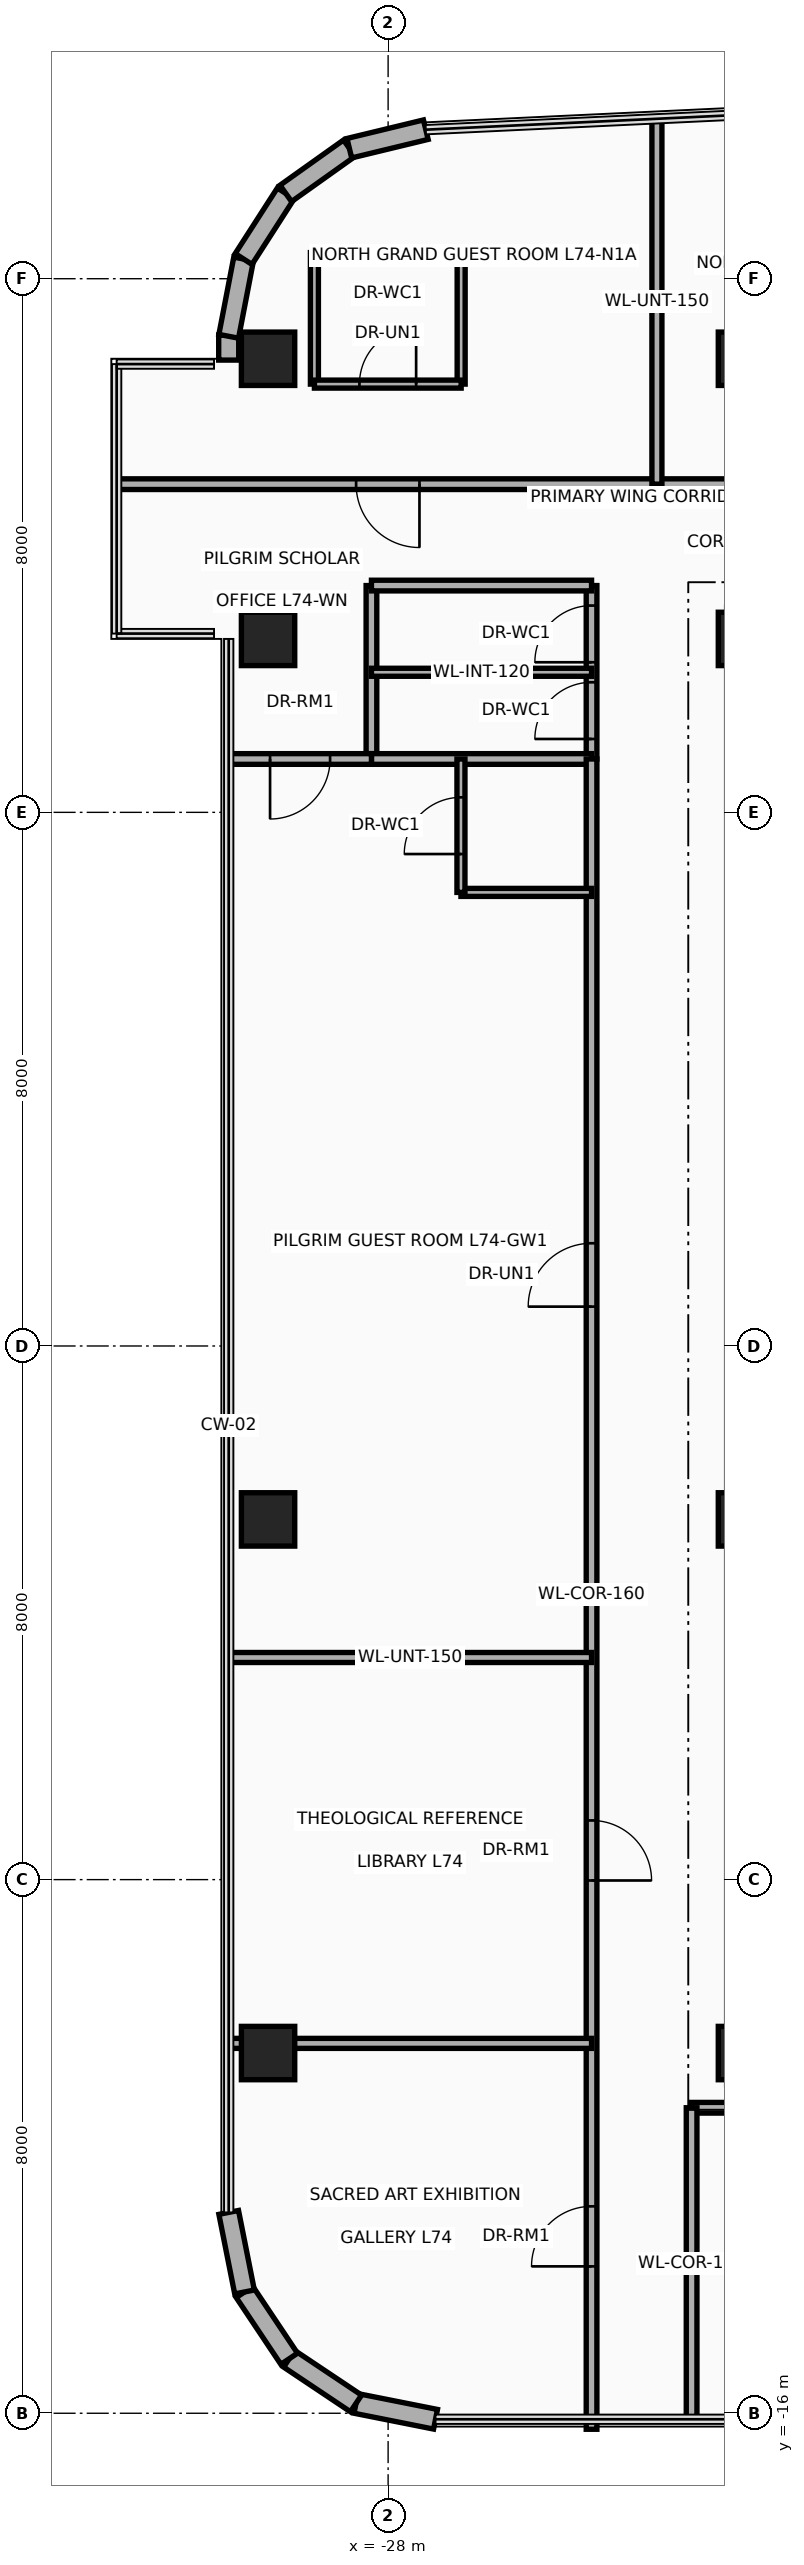
"""IFC4 building model, lengths in metres.
Left out: names, types, materials, properties, quantities, classifications, styles, units other than length and angle.
Written with IfcOpenShell. Run it as: python <this file> out.ifc"""

import sys

from ifc_helpers import new_model, si_unit, direction, frame, frame_2d, origin, origin_2d, place, context, subcontext, project, spatial, rectangle, extrude, source, transform, mapped, element, fill, save


model = new_model("IFC4")
c1 = context("Model", 3, precision=1e-05, world=origin(), true_north=direction((0.0, 1.0)))
c2 = subcontext(c1, "Body", "Model", "MODEL_VIEW")
j1 = project(units=[si_unit("LENGTHUNIT", "METRE"), si_unit("PLANEANGLEUNIT", "RADIAN")], contexts=[c1])
p1 = place(None, origin())
s1 = spatial("IfcSite", under=j1, at=p1, CompositionType="ELEMENT")
p2 = place(p1, origin())
s2 = spatial("IfcBuilding", under=s1, at=p2, CompositionType="ELEMENT")
p3 = place(p2, frame((0.0, 0.0, 283.5)))
s3 = spatial("IfcBuildingStorey", under=s2, at=p3, CompositionType="ELEMENT", Elevation=283.5)
m1 = source(origin(), c2, "Body", "SweptSolid", [
    extrude(rectangle(XDim=0.8, YDim=0.8, at=origin_2d()), origin(), (0.0, 0.0, 1.0), 3.5),
])
for number, where, z_axis, x_axis in (
    (1, (-29.8, -10.6, 0.0), (0.0, 0.0, 1.0), (1.0, 0.0, 0.0)),
    (2, (-22.65, -10.6, 0.0), (0.0, 0.0, 1.0), (1.0, 0.0, 0.0)),
    (3, (-29.8, -2.6, 0.0), (0.0, 0.0, 1.0), (1.0, 0.0, 0.0)),
    (4, (-22.65, -2.6, 0.0), (0.0, 0.0, 1.0), (1.0, 0.0, 0.0)),
    (5, (-29.8, 10.6, 0.0), (0.0, 0.0, 1.0), (1.0, 0.0, 0.0)),
    (6, (-22.65, 10.6, 0.0), (0.0, 0.0, 1.0), (1.0, 0.0, 0.0)),
    (7, (-29.8, 14.8, 0.0), (0.0, 0.0, 1.0), (1.0, 0.0, 0.0)),
    (8, (-22.65, 14.8, 0.0), (0.0, 0.0, 1.0), (1.0, 0.0, 0.0)),
):
    element("IfcColumn", number, at=place(p3, frame(where, z_axis=z_axis, x_axis=x_axis)), inside=s3, PredefinedType="COLUMN", context=c2, shape_type="MappedRepresentation", body=[
        mapped(m1, transform((0.0, 0.0, 0.0), x_axis=(1.0, 0.0, 0.0), y_axis=(0.0, 1.0, 0.0), z_axis=(0.0, 0.0, 1.0), scale=1.0)),
    ])
p4 = place(p3, frame((-30.39, 14.78, 0.0), z_axis=(0.0, 0.0, 1.0), x_axis=(0.0, 1.0, 0.0)))
e9 = element("IfcWall", 9, at=p4, inside=s3, PredefinedType="SOLIDWALL", context=c2, shape_type="SweptSolid", body=[
    extrude(rectangle(XDim=0.377, YDim=0.3, at=frame_2d((0.188, 0.0))), origin(), (0.0, 0.0, 1.0), 3.26),
])
p5 = place(p3, frame((-30.39, 15.137, 0.0), z_axis=(0.0, 0.0, 1.0), x_axis=(0.189307792679, 0.981917796779, 0.0)))
e10 = element("IfcWall", 10, at=p5, inside=s3, PredefinedType="SOLIDWALL", context=c2, shape_type="SweptSolid", body=[
    extrude(rectangle(XDim=1.18, YDim=0.3, at=frame_2d((0.59, 0.0))), origin(), (0.0, 0.0, 1.0), 3.26),
])
p6 = place(p3, frame((-30.167, 16.295, 0.0), z_axis=(0.0, 0.0, 1.0), x_axis=(0.540842020947, 0.841124193195, 0.0)))
e11 = element("IfcWall", 11, at=p6, inside=s3, PredefinedType="SOLIDWALL", context=c2, shape_type="SweptSolid", body=[
    extrude(rectangle(XDim=1.169, YDim=0.3, at=frame_2d((0.584, 0.0))), origin(), (0.0, 0.0, 1.0), 3.26),
])
p7 = place(p3, frame((-29.534, 17.279, 0.0), z_axis=(0.0, 0.0, 1.0), x_axis=(0.81466371606, 0.579933642527, 0.0)))
e12 = element("IfcWall", 12, at=p7, inside=s3, PredefinedType="SOLIDWALL", context=c2, shape_type="SweptSolid", body=[
    extrude(rectangle(XDim=1.169, YDim=0.3, at=frame_2d((0.584, 0.0))), origin(), (0.0, 0.0, 1.0), 3.26),
])
p8 = place(p3, frame((-28.582, 17.957, 0.0), z_axis=(0.0, 0.0, 1.0), x_axis=(0.971929016595, 0.235274279725, 0.0)))
e13 = element("IfcWall", 13, at=p8, inside=s3, PredefinedType="SOLIDWALL", context=c2, shape_type="SweptSolid", body=[
    extrude(rectangle(XDim=1.18, YDim=0.3, at=frame_2d((0.59, 0.0))), origin(), (0.0, 0.0, 1.0), 3.26),
])
p9 = place(p3, frame((-27.289, -16.09, 0.0), z_axis=(0.0, 0.0, 1.0), x_axis=(-0.980765602568, 0.195189223115, 0.0)))
e14 = element("IfcWall", 14, at=p9, inside=s3, PredefinedType="SOLIDWALL", context=c2, shape_type="SweptSolid", body=[
    extrude(rectangle(XDim=1.216, YDim=0.3, at=frame_2d((0.608, 0.0))), origin(), (0.0, 0.0, 1.0), 3.26),
])
for number, where, z_axis, x_axis in (
    (15, (-28.482, -15.853, 0.0), (0.0, 0.0, 1.0), (-0.831, 0.556, 0.0)),
    (16, (-29.483, -15.183, 0.0), (0.0, 0.0, 1.0), (-0.556, 0.831, 0.0)),
):
    element("IfcWall", number, at=place(p3, frame(where, z_axis=z_axis, x_axis=x_axis)), inside=s3, PredefinedType="SOLIDWALL", context=c2, shape_type="SweptSolid", body=[
        extrude(rectangle(XDim=1.205, YDim=0.3, at=frame_2d((0.603, 0.0))), origin(), (0.0, 0.0, 1.0), 3.26),
    ])
p10 = place(p3, frame((-30.153, -14.182, 0.0), z_axis=(0.0, 0.0, 1.0), x_axis=(-0.194996050505, 0.980804027463, 0.0)))
e17 = element("IfcWall", 17, at=p10, inside=s3, PredefinedType="SOLIDWALL", context=c2, shape_type="SweptSolid", body=[
    extrude(rectangle(XDim=1.216, YDim=0.3, at=frame_2d((0.608, 0.0))), origin(), (0.0, 0.0, 1.0), 3.26),
])
p11 = place(p3, frame((-28.25, 8.8, 0.0), z_axis=(0.0, 0.0, 1.0), x_axis=(0.0, 1.0, 0.0)))
e18 = element("IfcWall", 18, at=p11, inside=s3, PredefinedType="PARTITIONING", context=c2, shape_type="SweptSolid", body=[
    extrude(rectangle(XDim=2.6, YDim=0.16, at=frame_2d((1.3, 0.0))), origin(), (0.0, 0.0, 1.0), 2.623),
])
p12 = place(p3, frame((-24.95, 8.8, 0.0), z_axis=(0.0, 0.0, 1.0), x_axis=(0.0, 1.0, 0.0)))
e19 = element("IfcWall", 19, at=p12, inside=s3, PredefinedType="PARTITIONING", context=c2, shape_type="SweptSolid", body=[
    extrude(rectangle(XDim=2.6, YDim=0.16, at=frame_2d((1.3, 0.0))), origin(), (0.0, 0.0, 1.0), 2.623),
])
p13 = place(p12, frame((0.3, 0.0, 0.0)))
e20 = element("IfcOpeningElement", 20, at=p13, cuts=e19, PredefinedType="OPENING", context=c2, shape_type="SweptSolid", body=[
    extrude(rectangle(XDim=0.85, YDim=2.1, at=frame_2d((0.425, 1.05))), frame((0.0, 0.095, 0.0), z_axis=(0.0, -1.0, 0.0), x_axis=(1.0, 0.0, 0.0)), (0.0, 0.0, 1.0), 0.19),
])
p14 = place(p12, frame((1.45, 0.0, 0.0)))
e21 = element("IfcOpeningElement", 21, at=p14, cuts=e19, PredefinedType="OPENING", context=c2, shape_type="SweptSolid", body=[
    extrude(rectangle(XDim=0.85, YDim=2.1, at=frame_2d((0.425, 1.05))), frame((0.0, 0.095, 0.0), z_axis=(0.0, -1.0, 0.0), x_axis=(1.0, 0.0, 0.0)), (0.0, 0.0, 1.0), 0.19),
])
for number, where, z_axis, x_axis in (
    (22, (-28.25, 8.8, 0.0), (0.0, 0.0, 1.0), (1.0, 0.0, 0.0)),
    (23, (-28.25, 11.4, 0.0), (0.0, 0.0, 1.0), (1.0, 0.0, 0.0)),
):
    element("IfcWall", number, at=place(p3, frame(where, z_axis=z_axis, x_axis=x_axis)), inside=s3, PredefinedType="PARTITIONING", context=c2, shape_type="SweptSolid", body=[
        extrude(rectangle(XDim=3.3, YDim=0.16, at=frame_2d((1.65, 0.0))), origin(), (0.0, 0.0, 1.0), 3.26),
    ])
p15 = place(p3, frame((-28.25, 10.1, 0.0), z_axis=(0.0, 0.0, 1.0), x_axis=(1.0, 0.0, 0.0)))
e24 = element("IfcWall", 24, at=p15, inside=s3, PredefinedType="PARTITIONING", context=c2, shape_type="SweptSolid", body=[
    extrude(rectangle(XDim=3.3, YDim=0.12, at=frame_2d((1.65, 0.0))), origin(), (0.0, 0.0, 1.0), 3.26),
])
p16 = place(p3, frame((-23.45, -11.42, 0.0), z_axis=(0.0, 0.0, 1.0), x_axis=(1.0, 0.0, 0.0)))
e25 = element("IfcWall", 25, at=p16, inside=s3, PredefinedType="PARTITIONING", context=c2, shape_type="SweptSolid", body=[
    extrude(rectangle(XDim=13.84, YDim=0.16, at=frame_2d((6.92, 0.0))), origin(), (0.0, 0.0, 1.0), 2.634),
])
p17 = place(p3, frame((-23.45, -16.09, 0.0), z_axis=(0.0, 0.0, 1.0), x_axis=(0.0, 1.0, 0.0)))
e26 = element("IfcWall", 26, at=p17, inside=s3, PredefinedType="PARTITIONING", context=c2, shape_type="SweptSolid", body=[
    extrude(rectangle(XDim=4.67, YDim=0.16, at=frame_2d((2.335, 0.0))), origin(), (0.0, 0.0, 1.0), 3.26),
])
p18 = place(p3, frame((-24.95, -16.24, 0.0), z_axis=(0.0, 0.0, 1.0), x_axis=(0.0, 1.0, 0.0)))
e27 = element("IfcWall", 27, at=p18, inside=s3, PredefinedType="PARTITIONING", context=c2, shape_type="SweptSolid", body=[
    extrude(rectangle(XDim=25.04, YDim=0.16, at=frame_2d((12.52, 0.0))), origin(), (0.0, 0.0, 1.0), 2.623),
])
p19 = place(p18, frame((2.442, 0.0, 0.0)))
e28 = element("IfcOpeningElement", 28, at=p19, cuts=e27, PredefinedType="OPENING", context=c2, shape_type="SweptSolid", body=[
    extrude(rectangle(XDim=0.9, YDim=2.1, at=frame_2d((0.45, 1.05))), frame((0.0, 0.095, 0.0), z_axis=(0.0, -1.0, 0.0), x_axis=(1.0, 0.0, 0.0)), (0.0, 0.0, 1.0), 0.19),
])
p20 = place(p18, frame((8.227, 0.0, 0.0)))
e29 = element("IfcOpeningElement", 29, at=p20, cuts=e27, PredefinedType="OPENING", context=c2, shape_type="SweptSolid", body=[
    extrude(rectangle(XDim=0.9, YDim=2.1, at=frame_2d((0.45, 1.05))), frame((0.0, 0.095, 0.0), z_axis=(0.0, -1.0, 0.0), x_axis=(1.0, 0.0, 0.0)), (0.0, 0.0, 1.0), 0.19),
])
p21 = place(p18, frame((16.83, 0.0, 0.0)))
e30 = element("IfcOpeningElement", 30, at=p21, cuts=e27, PredefinedType="OPENING", context=c2, shape_type="SweptSolid", body=[
    extrude(rectangle(XDim=0.95, YDim=2.15, at=frame_2d((0.475, 1.075))), frame((0.0, 0.095, 0.0), z_axis=(0.0, -1.0, 0.0), x_axis=(1.0, 0.0, 0.0)), (0.0, 0.0, 1.0), 0.19),
])
p22 = place(p3, frame((-30.39, 8.8, 0.0), z_axis=(0.0, 0.0, 1.0), x_axis=(1.0, 0.0, 0.0)))
e31 = element("IfcWall", 31, at=p22, inside=s3, PredefinedType="PARTITIONING", context=c2, shape_type="SweptSolid", body=[
    extrude(rectangle(XDim=2.14, YDim=0.16, at=frame_2d((1.07, 0.0))), origin(), (0.0, 0.0, 1.0), 2.706),
])
p23 = place(p22, frame((0.62, 0.0, 0.0)))
e32 = element("IfcOpeningElement", 32, at=p23, cuts=e31, PredefinedType="OPENING", context=c2, shape_type="SweptSolid", body=[
    extrude(rectangle(XDim=0.9, YDim=2.1, at=frame_2d((0.45, 1.05))), frame((0.0, 0.095, 0.0), z_axis=(0.0, -1.0, 0.0), x_axis=(1.0, 0.0, 0.0)), (0.0, 0.0, 1.0), 0.19),
])
p24 = place(p3, frame((-30.39, -4.67, 0.0), z_axis=(0.0, 0.0, 1.0), x_axis=(1.0, 0.0, 0.0)))
e33 = element("IfcWall", 33, at=p24, inside=s3, PredefinedType="PARTITIONING", context=c2, shape_type="SweptSolid", body=[
    extrude(rectangle(XDim=5.44, YDim=0.15, at=frame_2d((2.72, 0.0))), origin(), (0.0, 0.0, 1.0), 2.706),
])
p25 = place(p3, frame((-30.39, -10.455, 0.0), z_axis=(0.0, 0.0, 1.0), x_axis=(1.0, 0.0, 0.0)))
e34 = element("IfcWall", 34, at=p25, inside=s3, PredefinedType="PARTITIONING", context=c2, shape_type="SweptSolid", body=[
    extrude(rectangle(XDim=5.44, YDim=0.15, at=frame_2d((2.72, 0.0))), origin(), (0.0, 0.0, 1.0), 2.623),
])
p26 = place(p3, frame((-26.908, 6.8, 0.0), z_axis=(0.0, 0.0, 1.0), x_axis=(1.0, 0.0, 0.0)))
e35 = element("IfcWall", 35, at=p26, inside=s3, PredefinedType="PARTITIONING", context=c2, shape_type="SweptSolid", body=[
    extrude(rectangle(XDim=1.958, YDim=0.12, at=frame_2d((0.979, 0.0))), origin(), (0.0, 0.0, 1.0), 2.839),
])
p27 = place(p3, frame((-26.908, 6.8, 0.0), z_axis=(0.0, 0.0, 1.0), x_axis=(0.0, 1.0, 0.0)))
e36 = element("IfcWall", 36, at=p27, inside=s3, PredefinedType="PARTITIONING", context=c2, shape_type="SweptSolid", body=[
    extrude(rectangle(XDim=2.0, YDim=0.12, at=frame_2d((1.0, 0.0))), origin(), (0.0, 0.0, 1.0), 2.839),
])
p28 = place(p27, frame((0.575, 0.0, 0.0)))
e37 = element("IfcOpeningElement", 37, at=p28, cuts=e36, PredefinedType="OPENING", context=c2, shape_type="SweptSolid", body=[
    extrude(rectangle(XDim=0.85, YDim=2.1, at=frame_2d((0.425, 1.05))), frame((0.0, 0.075, 0.0), z_axis=(0.0, -1.0, 0.0), x_axis=(1.0, 0.0, 0.0)), (0.0, 0.0, 1.0), 0.15),
])
p29 = place(p3, frame((-32.04, 12.92, 0.0), z_axis=(0.0, 0.0, 1.0), x_axis=(1.0, 0.0, 0.0)))
e38 = element("IfcWall", 38, at=p29, inside=s3, PredefinedType="PARTITIONING", context=c2, shape_type="SweptSolid", body=[
    extrude(rectangle(XDim=31.13, YDim=0.16, at=frame_2d((15.565, 0.0))), origin(), (0.0, 0.0, 1.0), 2.634),
])
p30 = place(p29, frame((3.56, 0.0, 0.0)))
e39 = element("IfcOpeningElement", 39, at=p30, cuts=e38, PredefinedType="OPENING", context=c2, shape_type="SweptSolid", body=[
    extrude(rectangle(XDim=0.95, YDim=2.15, at=frame_2d((0.475, 1.075))), frame((0.0, 0.095, 0.0), z_axis=(0.0, -1.0, 0.0), x_axis=(1.0, 0.0, 0.0)), (0.0, 0.0, 1.0), 0.19),
])
p31 = place(p29, frame((10.53, 0.0, 0.0)))
e40 = element("IfcOpeningElement", 40, at=p31, cuts=e38, PredefinedType="OPENING", context=c2, shape_type="SweptSolid", body=[
    extrude(rectangle(XDim=0.95, YDim=2.15, at=frame_2d((0.475, 1.075))), frame((0.0, 0.095, 0.0), z_axis=(0.0, -1.0, 0.0), x_axis=(1.0, 0.0, 0.0)), (0.0, 0.0, 1.0), 0.19),
])
p32 = place(p29, frame((22.735, 0.0, 0.0)))
e41 = element("IfcOpeningElement", 41, at=p32, cuts=e38, PredefinedType="OPENING", context=c2, shape_type="SweptSolid", body=[
    extrude(rectangle(XDim=1.8, YDim=2.15, at=frame_2d((0.9, 1.075))), frame((0.0, 0.095, 0.0), z_axis=(0.0, -1.0, 0.0), x_axis=(1.0, 0.0, 0.0)), (0.0, 0.0, 1.0), 0.19),
])
p33 = place(p3, frame((-23.97, 12.92, 0.0), z_axis=(0.0, 0.0, 1.0), x_axis=(0.0, 1.0, 0.0)))
e42 = element("IfcWall", 42, at=p33, inside=s3, PredefinedType="PARTITIONING", context=c2, shape_type="SweptSolid", body=[
    extrude(rectangle(XDim=5.478, YDim=0.15, at=frame_2d((2.739, 0.0))), origin(), (0.0, 0.0, 1.0), 2.623),
])
for number, where, z_axis, x_axis in (
    (43, (-29.105, 14.42, 0.0), (0.0, 0.0, 1.0), (0.0, 1.0, 0.0)),
    (44, (-26.905, 14.42, 0.0), (0.0, 0.0, 1.0), (0.0, 1.0, 0.0)),
):
    element("IfcWall", number, at=place(p3, frame(where, z_axis=z_axis, x_axis=x_axis)), inside=s3, PredefinedType="PARTITIONING", context=c2, shape_type="SweptSolid", body=[
        extrude(rectangle(XDim=1.972, YDim=0.12, at=frame_2d((0.986, 0.0))), origin(), (0.0, 0.0, 1.0), 2.623),
    ])
p34 = place(p3, frame((-29.105, 16.392, 0.0), z_axis=(0.0, 0.0, 1.0), x_axis=(1.0, 0.0, 0.0)))
e45 = element("IfcWall", 45, at=p34, inside=s3, PredefinedType="PARTITIONING", context=c2, shape_type="SweptSolid", body=[
    extrude(rectangle(XDim=2.2, YDim=0.12, at=frame_2d((1.1, 0.0))), origin(), (0.0, 0.0, 1.0), 3.26),
])
p35 = place(p3, frame((-29.105, 14.42, 0.0), z_axis=(0.0, 0.0, 1.0), x_axis=(1.0, 0.0, 0.0)))
e46 = element("IfcWall", 46, at=p35, inside=s3, PredefinedType="PARTITIONING", context=c2, shape_type="SweptSolid", body=[
    extrude(rectangle(XDim=2.2, YDim=0.12, at=frame_2d((1.1, 0.0))), origin(), (0.0, 0.0, 1.0), 3.26),
])
p36 = place(p35, frame((0.675, 0.0, 0.0)))
e47 = element("IfcOpeningElement", 47, at=p36, cuts=e46, PredefinedType="OPENING", context=c2, shape_type="SweptSolid", body=[
    extrude(rectangle(XDim=0.85, YDim=2.1, at=frame_2d((0.425, 1.05))), frame((0.0, 0.075, 0.0), z_axis=(0.0, -1.0, 0.0), x_axis=(1.0, 0.0, 0.0)), (0.0, 0.0, 1.0), 0.15),
])
p37 = place(p13, origin())
e48 = element("IfcDoor", 48, at=p37, inside=s3, OperationType="SINGLE_SWING_LEFT", PredefinedType="DOOR", context=c2, shape_type="SweptSolid", body=[
    extrude(rectangle(XDim=0.85, YDim=2.1, at=frame_2d((0.425, 1.05))), frame((0.0, 0.025, 0.0), z_axis=(0.0, -1.0, 0.0), x_axis=(1.0, 0.0, 0.0)), (0.0, 0.0, 1.0), 0.05),
])
fill(e20, e48)
p38 = place(p14, origin())
e49 = element("IfcDoor", 49, at=p38, inside=s3, OperationType="SINGLE_SWING_RIGHT", PredefinedType="DOOR", context=c2, shape_type="SweptSolid", body=[
    extrude(rectangle(XDim=0.85, YDim=2.1, at=frame_2d((0.425, 1.05))), frame((0.0, 0.025, 0.0), z_axis=(0.0, -1.0, 0.0), x_axis=(1.0, 0.0, 0.0)), (0.0, 0.0, 1.0), 0.05),
])
fill(e21, e49)
p39 = place(p23, frame((0.9, 0.0, 0.0), z_axis=(0.0, 0.0, 1.0), x_axis=(-1.0, 0.0, 0.0)))
e50 = element("IfcDoor", 50, at=p39, inside=s3, OperationType="SINGLE_SWING_LEFT", PredefinedType="DOOR", context=c2, shape_type="SweptSolid", body=[
    extrude(rectangle(XDim=0.9, YDim=2.1, at=frame_2d((0.45, 1.05))), frame((0.0, 0.025, 0.0), z_axis=(0.0, -1.0, 0.0), x_axis=(1.0, 0.0, 0.0)), (0.0, 0.0, 1.0), 0.05),
])
fill(e32, e50)
p40 = place(p19, origin())
e51 = element("IfcDoor", 51, at=p40, inside=s3, OperationType="SINGLE_SWING_RIGHT", PredefinedType="DOOR", context=c2, shape_type="SweptSolid", body=[
    extrude(rectangle(XDim=0.9, YDim=2.1, at=frame_2d((0.45, 1.05))), frame((0.0, 0.025, 0.0), z_axis=(0.0, -1.0, 0.0), x_axis=(1.0, 0.0, 0.0)), (0.0, 0.0, 1.0), 0.05),
])
fill(e28, e51)
p41 = place(p20, frame((0.9, 0.0, 0.0), z_axis=(0.0, 0.0, 1.0), x_axis=(-1.0, 0.0, 0.0)))
e52 = element("IfcDoor", 52, at=p41, inside=s3, OperationType="SINGLE_SWING_LEFT", PredefinedType="DOOR", context=c2, shape_type="SweptSolid", body=[
    extrude(rectangle(XDim=0.9, YDim=2.1, at=frame_2d((0.45, 1.05))), frame((0.0, 0.025, 0.0), z_axis=(0.0, -1.0, 0.0), x_axis=(1.0, 0.0, 0.0)), (0.0, 0.0, 1.0), 0.05),
])
fill(e29, e52)
p42 = place(p21, origin())
e53 = element("IfcDoor", 53, at=p42, inside=s3, OperationType="SINGLE_SWING_RIGHT", PredefinedType="DOOR", context=c2, shape_type="SweptSolid", body=[
    extrude(rectangle(XDim=0.95, YDim=2.15, at=frame_2d((0.475, 1.075))), frame((0.0, 0.025, 0.0), z_axis=(0.0, -1.0, 0.0), x_axis=(1.0, 0.0, 0.0)), (0.0, 0.0, 1.0), 0.05),
])
fill(e30, e53)
p43 = place(p28, origin())
e54 = element("IfcDoor", 54, at=p43, inside=s3, OperationType="SINGLE_SWING_LEFT", PredefinedType="DOOR", context=c2, shape_type="SweptSolid", body=[
    extrude(rectangle(XDim=0.85, YDim=2.1, at=frame_2d((0.425, 1.05))), frame((0.0, 0.025, 0.0), z_axis=(0.0, -1.0, 0.0), x_axis=(1.0, 0.0, 0.0)), (0.0, 0.0, 1.0), 0.05),
])
fill(e37, e54)
p44 = place(p30, frame((0.95, 0.0, 0.0), z_axis=(0.0, 0.0, 1.0), x_axis=(-1.0, 0.0, 0.0)))
e55 = element("IfcDoor", 55, at=p44, inside=s3, OperationType="SINGLE_SWING_LEFT", PredefinedType="DOOR", context=c2, shape_type="SweptSolid", body=[
    extrude(rectangle(XDim=0.95, YDim=2.15, at=frame_2d((0.475, 1.075))), frame((0.0, 0.025, 0.0), z_axis=(0.0, -1.0, 0.0), x_axis=(1.0, 0.0, 0.0)), (0.0, 0.0, 1.0), 0.05),
])
fill(e39, e55)
p45 = place(p36, origin())
e56 = element("IfcDoor", 56, at=p45, inside=s3, OperationType="SINGLE_SWING_RIGHT", PredefinedType="DOOR", context=c2, shape_type="SweptSolid", body=[
    extrude(rectangle(XDim=0.85, YDim=2.1, at=frame_2d((0.425, 1.05))), frame((0.0, 0.025, 0.0), z_axis=(0.0, -1.0, 0.0), x_axis=(1.0, 0.0, 0.0)), (0.0, 0.0, 1.0), 0.05),
])
fill(e47, e56)
save(model, sys.argv[1])
